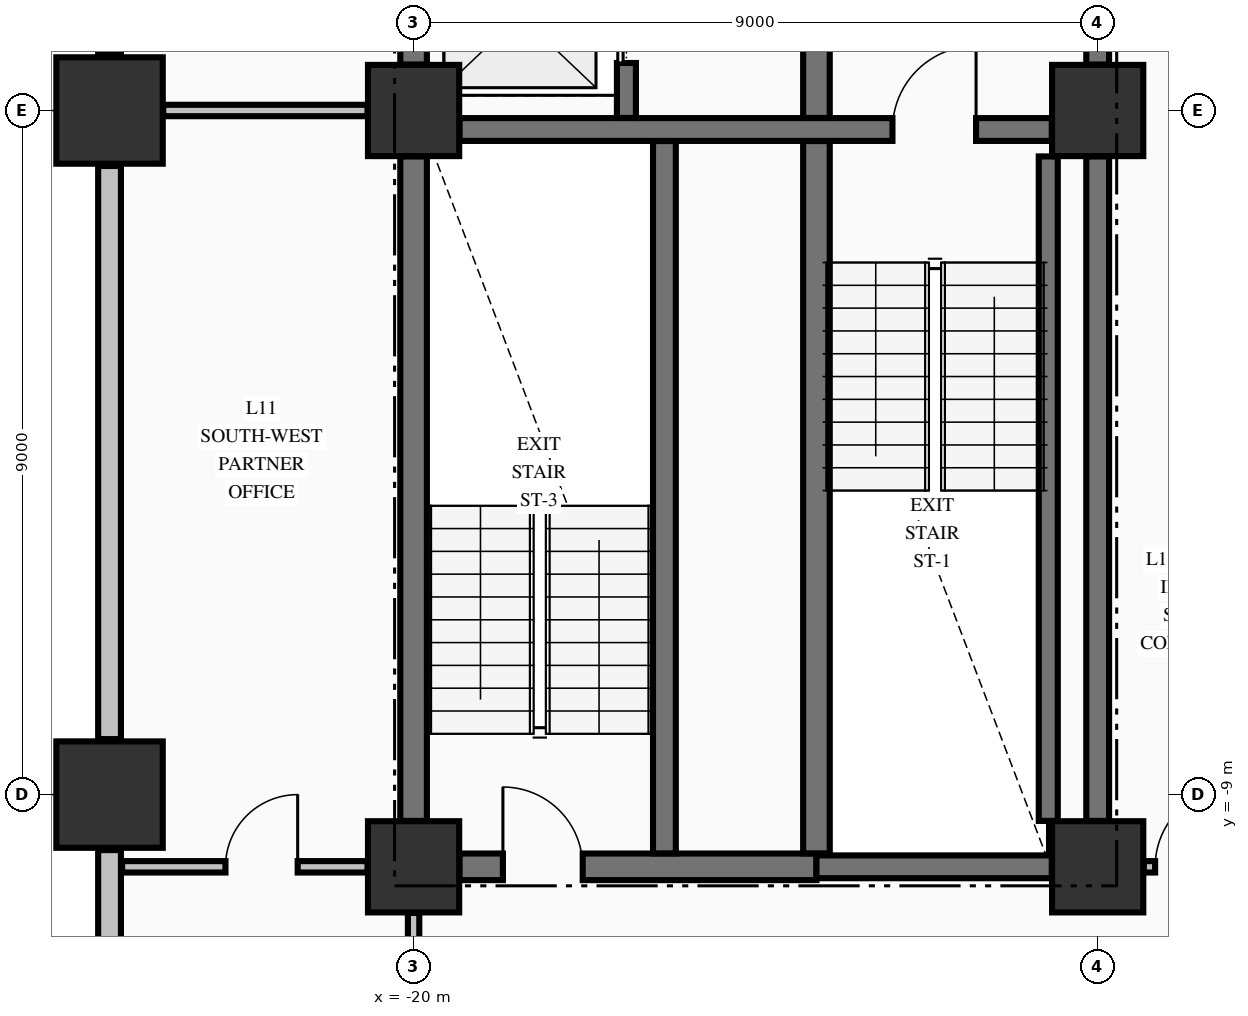
"""IFC4 building model, lengths in metres.
Left out: names, types, materials, properties, quantities, classifications, styles, units other than length and angle.
Written with IfcOpenShell. Run it as: python <this file> out.ifc"""

import sys

from ifc_helpers import new_model, si_unit, direction, frame, frame_2d, origin, origin_2d, place, context, subcontext, project, spatial, rectangle, extrude, element, fill, save


model = new_model("IFC4")
c1 = context("Model", 3, precision=1e-05, world=origin(), true_north=direction((0.0, 1.0)))
c2 = subcontext(c1, "Body", "Model", "MODEL_VIEW")
j1 = project(units=[si_unit("LENGTHUNIT", "METRE"), si_unit("PLANEANGLEUNIT", "RADIAN")], contexts=[c1])
p1 = place(None, origin())
s1 = spatial("IfcSite", under=j1, at=p1, CompositionType="ELEMENT")
p2 = place(p1, origin())
s2 = spatial("IfcBuilding", under=s1, at=p2, CompositionType="ELEMENT")
p3 = place(p2, frame((0.0, 0.0, 48.62)))
s3 = spatial("IfcBuildingStorey", under=s2, at=p3, CompositionType="ELEMENT", Elevation=48.62)
for number, where, z_axis, x_axis in (
    (1, (-24.0, -9.0, -0.25), (0.0, 0.0, 1.0), (1.0, 0.0, 0.0)),
    (2, (-24.0, 0.0, -0.25), (0.0, 0.0, 1.0), (1.0, 0.0, 0.0)),
):
    element("IfcColumn", number, at=place(p3, frame(where, z_axis=z_axis, x_axis=x_axis)), inside=s3, PredefinedType="COLUMN", context=c2, shape_type="SweptSolid", body=[
        extrude(rectangle(XDim=1.4, YDim=1.4, at=origin_2d()), origin(), (0.0, 0.0, 1.0), 3.395),
    ])
for number, where, z_axis, x_axis in (
    (3, (-20.0, -9.95, -0.25), (0.0, 0.0, 1.0), (1.0, 0.0, 0.0)),
    (4, (-11.0, -9.95, -0.25), (0.0, 0.0, 1.0), (1.0, 0.0, 0.0)),
    (5, (-11.0, 0.0, -0.25), (0.0, 0.0, 1.0), (1.0, 0.0, 0.0)),
    (6, (-20.0, 0.0, -0.25), (0.0, 0.0, 1.0), (1.0, 0.0, 0.0)),
):
    element("IfcColumn", number, at=place(p3, frame(where, z_axis=z_axis, x_axis=x_axis)), inside=s3, PredefinedType="COLUMN", context=c2, shape_type="SweptSolid", body=[
        extrude(rectangle(XDim=1.2, YDim=1.2, at=origin_2d()), origin(), (0.0, 0.0, 1.0), 3.395),
    ])
p4 = place(p3, frame((-24.0, -9.73, 0.0), z_axis=(0.0, 0.0, 1.0), x_axis=(0.0, -1.0, 0.0)))
e7 = element("IfcWall", 7, at=p4, inside=s3, PredefinedType="STANDARD", context=c2, shape_type="SweptSolid", body=[
    extrude(rectangle(XDim=12.54, YDim=0.3, at=frame_2d((6.27, 0.0))), origin(), (0.0, 0.0, 1.0), 2.537),
])
for number, where, z_axis, x_axis in (
    (8, (-24.0, -0.73, 0.0), (0.0, 0.0, 1.0), (0.0, -1.0, 0.0)),
    (9, (-24.0, 8.27, 0.0), (0.0, 0.0, 1.0), (0.0, -1.0, 0.0)),
):
    element("IfcWall", number, at=place(p3, frame(where, z_axis=z_axis, x_axis=x_axis)), inside=s3, PredefinedType="STANDARD", context=c2, shape_type="SweptSolid", body=[
        extrude(rectangle(XDim=7.54, YDim=0.3, at=frame_2d((3.77, 0.0))), origin(), (0.0, 0.0, 1.0), 2.537),
    ])
p5 = place(p3, frame((-19.396, -9.95, 0.0), z_axis=(0.0, 0.0, 1.0), x_axis=(1.0, 0.0, 0.0)))
e10 = element("IfcWall", 10, at=p5, inside=s3, PredefinedType="SHEAR", context=c2, shape_type="SweptSolid", body=[
    extrude(rectangle(XDim=4.696, YDim=0.35, at=frame_2d((2.348, 0.0))), origin(), (0.0, 0.0, 1.0), 3.145),
])
p6 = place(p5, frame((0.571, 0.0, 0.0)))
e11 = element("IfcOpeningElement", 11, at=p6, cuts=e10, PredefinedType="OPENING", context=c2, shape_type="SweptSolid", body=[
    extrude(rectangle(XDim=1.05, YDim=2.15, at=frame_2d((0.525, 1.075))), frame((0.0, 0.185, 0.0), z_axis=(0.0, -1.0, 0.0), x_axis=(1.0, 0.0, 0.0)), (0.0, 0.0, 1.0), 0.37),
])
p7 = place(p3, frame((-14.7, -9.95, 0.0), z_axis=(0.0, 0.0, 1.0), x_axis=(1.0, 0.0, 0.0)))
e12 = element("IfcWall", 12, at=p7, inside=s3, PredefinedType="SHEAR", context=c2, shape_type="SweptSolid", body=[
    extrude(rectangle(XDim=3.096, YDim=0.3, at=frame_2d((1.548, 0.0))), origin(), (0.0, 0.0, 1.0), 3.145),
])
p8 = place(p3, frame((-19.396, -0.25, 0.0), z_axis=(0.0, 0.0, 1.0), x_axis=(1.0, 0.0, 0.0)))
e13 = element("IfcWall", 13, at=p8, inside=s3, PredefinedType="SHEAR", context=c2, shape_type="SweptSolid", body=[
    extrude(rectangle(XDim=7.792, YDim=0.3, at=frame_2d((3.896, 0.0))), origin(), (0.0, 0.0, 1.0), 3.145),
])
p9 = place(p8, frame((5.696, 0.0, 0.0)))
e14 = element("IfcOpeningElement", 14, at=p9, cuts=e13, PredefinedType="OPENING", context=c2, shape_type="SweptSolid", body=[
    extrude(rectangle(XDim=1.1, YDim=2.15, at=frame_2d((0.55, 1.075))), frame((0.0, 0.16, 0.0), z_axis=(0.0, -1.0, 0.0), x_axis=(1.0, 0.0, 0.0)), (0.0, 0.0, 1.0), 0.32),
])
p10 = place(p3, frame((-23.835, -9.95, 0.0), z_axis=(0.0, 0.0, 1.0), x_axis=(1.0, 0.0, 0.0)))
e15 = element("IfcWall", 15, at=p10, inside=s3, PredefinedType="PARTITIONING", context=c2, shape_type="SweptSolid", body=[
    extrude(rectangle(XDim=3.229, YDim=0.15, at=frame_2d((1.615, 0.0))), origin(), (0.0, 0.0, 1.0), 3.145),
])
p11 = place(p10, frame((1.36, 0.0, 0.0)))
e16 = element("IfcOpeningElement", 16, at=p11, cuts=e15, PredefinedType="OPENING", context=c2, shape_type="SweptSolid", body=[
    extrude(rectangle(XDim=0.95, YDim=2.15, at=frame_2d((0.475, 1.075))), frame((0.0, 0.085, 0.0), z_axis=(0.0, -1.0, 0.0), x_axis=(1.0, 0.0, 0.0)), (0.0, 0.0, 1.0), 0.17),
])
p12 = place(p3, frame((-10.394, -9.95, 0.0), z_axis=(0.0, 0.0, 1.0), x_axis=(1.0, 0.0, 0.0)))
e17 = element("IfcWall", 17, at=p12, inside=s3, PredefinedType="PARTITIONING", context=c2, shape_type="SweptSolid", body=[
    extrude(rectangle(XDim=20.788, YDim=0.15, at=frame_2d((10.394, 0.0))), origin(), (0.0, 0.0, 1.0), 3.145),
])
p13 = place(p12, frame((0.15, 0.0, 0.0)))
e18 = element("IfcOpeningElement", 18, at=p13, cuts=e17, PredefinedType="OPENING", context=c2, shape_type="SweptSolid", body=[
    extrude(rectangle(XDim=1.05, YDim=2.15, at=frame_2d((0.525, 1.075))), frame((0.0, 0.085, 0.0), z_axis=(0.0, -1.0, 0.0), x_axis=(1.0, 0.0, 0.0)), (0.0, 0.0, 1.0), 0.17),
])
p14 = place(p12, frame((19.588, 0.0, 0.0)))
e19 = element("IfcOpeningElement", 19, at=p14, cuts=e17, PredefinedType="OPENING", context=c2, shape_type="SweptSolid", body=[
    extrude(rectangle(XDim=1.05, YDim=2.15, at=frame_2d((0.525, 1.075))), frame((0.0, 0.085, 0.0), z_axis=(0.0, -1.0, 0.0), x_axis=(1.0, 0.0, 0.0)), (0.0, 0.0, 1.0), 0.17),
])
p15 = place(p12, frame((12.669, 0.0, 0.0)))
e20 = element("IfcOpeningElement", 20, at=p15, cuts=e17, PredefinedType="OPENING", context=c2, shape_type="SweptSolid", body=[
    extrude(rectangle(XDim=0.95, YDim=2.15, at=frame_2d((0.475, 1.075))), frame((0.0, 0.085, 0.0), z_axis=(0.0, -1.0, 0.0), x_axis=(1.0, 0.0, 0.0)), (0.0, 0.0, 1.0), 0.17),
])
p16 = place(p3, frame((-23.294, 0.0, 0.0), z_axis=(0.0, 0.0, 1.0), x_axis=(1.0, 0.0, 0.0)))
e21 = element("IfcWall", 21, at=p16, inside=s3, PredefinedType="PARTITIONING", context=c2, shape_type="SweptSolid", body=[
    extrude(rectangle(XDim=2.688, YDim=0.15, at=frame_2d((1.344, 0.0))), origin(), (0.0, 0.0, 1.0), 2.485),
])
p17 = place(p3, frame((-20.0, -9.346, 0.0), z_axis=(0.0, 0.0, 1.0), x_axis=(0.0, 1.0, 0.0)))
e22 = element("IfcWall", 22, at=p17, inside=s3, PredefinedType="SHEAR", context=c2, shape_type="SweptSolid", body=[
    extrude(rectangle(XDim=8.742, YDim=0.35, at=frame_2d((4.371, 0.0))), origin(), (0.0, 0.0, 1.0), 3.145),
])
p18 = place(p3, frame((-20.0, 0.604, 0.0), z_axis=(0.0, 0.0, 1.0), x_axis=(0.0, 1.0, 0.0)))
e23 = element("IfcWall", 23, at=p18, inside=s3, PredefinedType="SHEAR", context=c2, shape_type="SweptSolid", body=[
    extrude(rectangle(XDim=1.869, YDim=0.35, at=frame_2d((0.935, 0.0))), origin(), (0.0, 0.0, 1.0), 3.145),
])
p19 = place(p3, frame((-17.2, -0.098, 0.0), z_axis=(0.0, 0.0, 1.0), x_axis=(0.0, 1.0, 0.0)))
e24 = element("IfcWall", 24, at=p19, inside=s3, PredefinedType="SOLIDWALL", context=c2, shape_type="SweptSolid", body=[
    extrude(rectangle(XDim=2.571, YDim=0.25, at=frame_2d((1.285, 0.0))), origin(), (0.0, 0.0, 1.0), 3.145),
])
p20 = place(p19, frame((0.723, 0.0, 0.0)))
e25 = element("IfcOpeningElement", 25, at=p20, cuts=e24, PredefinedType="OPENING", context=c2, shape_type="SweptSolid", body=[
    extrude(rectangle(XDim=1.1, YDim=2.2, at=frame_2d((0.55, 1.1))), frame((0.0, 0.135, 0.0), z_axis=(0.0, -1.0, 0.0), x_axis=(1.0, 0.0, 0.0)), (0.0, 0.0, 1.0), 0.27),
])
p21 = place(p3, frame((-16.7, -9.773, 0.0), z_axis=(0.0, 0.0, 1.0), x_axis=(0.0, 1.0, 0.0)))
e26 = element("IfcWall", 26, at=p21, inside=s3, PredefinedType="SHEAR", context=c2, shape_type="SweptSolid", body=[
    extrude(rectangle(XDim=9.371, YDim=0.3, at=frame_2d((4.686, 0.0))), origin(), (0.0, 0.0, 1.0), 3.145),
])
p22 = place(p3, frame((-14.7, -9.773, 0.0), z_axis=(0.0, 0.0, 1.0), x_axis=(0.0, 1.0, 0.0)))
e27 = element("IfcWall", 27, at=p22, inside=s3, PredefinedType="SHEAR", context=c2, shape_type="SweptSolid", body=[
    extrude(rectangle(XDim=9.371, YDim=0.35, at=frame_2d((4.686, 0.0))), origin(), (0.0, 0.0, 1.0), 3.145),
])
p23 = place(p3, frame((-14.7, -0.098, 0.0), z_axis=(0.0, 0.0, 1.0), x_axis=(0.0, 1.0, 0.0)))
e28 = element("IfcWall", 28, at=p23, inside=s3, PredefinedType="SHEAR", context=c2, shape_type="SweptSolid", body=[
    extrude(rectangle(XDim=2.846, YDim=0.35, at=frame_2d((1.423, 0.0))), origin(), (0.0, 0.0, 1.0), 3.145),
])
p24 = place(p3, frame((-11.65, -9.346, 0.0), z_axis=(0.0, 0.0, 1.0), x_axis=(0.0, 1.0, 0.0)))
e29 = element("IfcWall", 29, at=p24, inside=s3, PredefinedType="SOLIDWALL", context=c2, shape_type="SweptSolid", body=[
    extrude(rectangle(XDim=8.742, YDim=0.25, at=frame_2d((4.371, 0.0))), origin(), (0.0, 0.0, 1.0), 3.145),
])
p25 = place(p3, frame((-11.0, -9.346, 0.0), z_axis=(0.0, 0.0, 1.0), x_axis=(0.0, 1.0, 0.0)))
e30 = element("IfcWall", 30, at=p25, inside=s3, PredefinedType="SHEAR", context=c2, shape_type="SweptSolid", body=[
    extrude(rectangle(XDim=8.742, YDim=0.3, at=frame_2d((4.371, 0.0))), origin(), (0.0, 0.0, 1.0), 3.145),
])
p26 = place(p3, frame((-11.0, 0.604, 0.0), z_axis=(0.0, 0.0, 1.0), x_axis=(0.0, 1.0, 0.0)))
e31 = element("IfcWall", 31, at=p26, inside=s3, PredefinedType="SHEAR", context=c2, shape_type="SweptSolid", body=[
    extrude(rectangle(XDim=2.144, YDim=0.3, at=frame_2d((1.072, 0.0))), origin(), (0.0, 0.0, 1.0), 3.145),
])
p27 = place(p26, frame((0.496, 0.0, 0.0)))
e32 = element("IfcOpeningElement", 32, at=p27, cuts=e31, PredefinedType="OPENING", context=c2, shape_type="SweptSolid", body=[
    extrude(rectangle(XDim=1.1, YDim=2.15, at=frame_2d((0.55, 1.075))), frame((0.0, 0.16, 0.0), z_axis=(0.0, -1.0, 0.0), x_axis=(1.0, 0.0, 0.0)), (0.0, 0.0, 1.0), 0.32),
])
p28 = place(p3, frame((-20.0, -13.022, 0.0), z_axis=(0.0, 0.0, 1.0), x_axis=(0.0, 1.0, 0.0)))
e33 = element("IfcWall", 33, at=p28, inside=s3, PredefinedType="PARTITIONING", context=c2, shape_type="SweptSolid", body=[
    extrude(rectangle(XDim=2.466, YDim=0.15, at=frame_2d((1.233, 0.0))), origin(), (0.0, 0.0, 1.0), 3.145),
])
p29 = place(p28, frame((1.027, 0.0, 0.0)))
e34 = element("IfcOpeningElement", 34, at=p29, cuts=e33, PredefinedType="OPENING", context=c2, shape_type="SweptSolid", body=[
    extrude(rectangle(XDim=0.95, YDim=2.15, at=frame_2d((0.475, 1.075))), frame((0.0, 0.085, 0.0), z_axis=(0.0, -1.0, 0.0), x_axis=(1.0, 0.0, 0.0)), (0.0, 0.0, 1.0), 0.17),
])
p30 = place(p9, origin())
e35 = element("IfcDoor", 35, at=p30, inside=s3, OperationType="SINGLE_SWING_RIGHT", PredefinedType="DOOR", context=c2, shape_type="SweptSolid", body=[
    extrude(rectangle(XDim=1.1, YDim=2.15, at=frame_2d((0.55, 1.075))), frame((0.0, 0.025, 0.0), z_axis=(0.0, -1.0, 0.0), x_axis=(1.0, 0.0, 0.0)), (0.0, 0.0, 1.0), 0.05),
])
fill(e14, e35)
p31 = place(p6, origin())
e36 = element("IfcDoor", 36, at=p31, inside=s3, OperationType="SINGLE_SWING_LEFT", PredefinedType="DOOR", context=c2, shape_type="SweptSolid", body=[
    extrude(rectangle(XDim=1.05, YDim=2.15, at=frame_2d((0.525, 1.075))), frame((0.0, 0.025, 0.0), z_axis=(0.0, -1.0, 0.0), x_axis=(1.0, 0.0, 0.0)), (0.0, 0.0, 1.0), 0.05),
])
fill(e11, e36)
p32 = place(p20, origin())
e37 = element("IfcDoor", 37, at=p32, inside=s3, OperationType="SLIDING_TO_LEFT", PredefinedType="DOOR", context=c2, shape_type="SweptSolid", body=[
    extrude(rectangle(XDim=1.1, YDim=2.2, at=frame_2d((0.55, 1.1))), frame((0.0, 0.025, 0.0), z_axis=(0.0, -1.0, 0.0), x_axis=(1.0, 0.0, 0.0)), (0.0, 0.0, 1.0), 0.05),
])
fill(e25, e37)
p33 = place(p13, origin())
e38 = element("IfcDoor", 38, at=p33, inside=s3, OperationType="SINGLE_SWING_RIGHT", PredefinedType="DOOR", context=c2, shape_type="SweptSolid", body=[
    extrude(rectangle(XDim=1.05, YDim=2.15, at=frame_2d((0.525, 1.075))), frame((0.0, 0.025, 0.0), z_axis=(0.0, -1.0, 0.0), x_axis=(1.0, 0.0, 0.0)), (0.0, 0.0, 1.0), 0.05),
])
fill(e18, e38)
p34 = place(p11, origin())
e39 = element("IfcDoor", 39, at=p34, inside=s3, OperationType="SINGLE_SWING_RIGHT", PredefinedType="DOOR", context=c2, shape_type="SweptSolid", body=[
    extrude(rectangle(XDim=0.95, YDim=2.15, at=frame_2d((0.475, 1.075))), frame((0.0, 0.025, 0.0), z_axis=(0.0, -1.0, 0.0), x_axis=(1.0, 0.0, 0.0)), (0.0, 0.0, 1.0), 0.05),
])
fill(e16, e39)
save(model, sys.argv[1])
